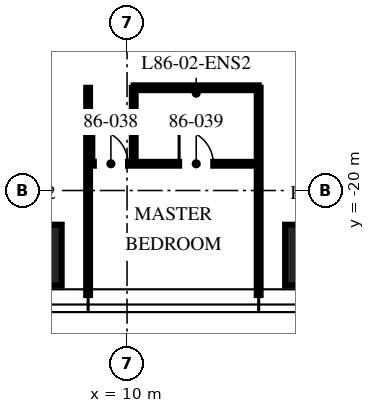
"""IFC4 building model, lengths in metres.
Left out: names, types, materials, properties, quantities, classifications, styles, units other than length and angle.
Written with IfcOpenShell. Run it as: python <this file> out.ifc"""

import sys

from ifc_helpers import new_model, si_unit, direction, frame, frame_2d, origin, origin_2d, place, context, subcontext, project, spatial, rectangle, extrude, element, fill, save


model = new_model("IFC4")
c1 = context("Model", 3, precision=1e-05, world=origin(), true_north=direction((0.0, 1.0)))
c2 = subcontext(c1, "Body", "Model", "MODEL_VIEW")
j1 = project(units=[si_unit("LENGTHUNIT", "METRE"), si_unit("PLANEANGLEUNIT", "RADIAN")], contexts=[c1])
p1 = place(None, origin())
s1 = spatial("IfcSite", under=j1, at=p1, CompositionType="ELEMENT")
p2 = place(p1, origin())
s2 = spatial("IfcBuilding", under=s1, at=p2, CompositionType="ELEMENT")
p3 = place(p2, frame((0.0, 0.0, 342.0)))
s3 = spatial("IfcBuildingStorey", under=s2, at=p3, CompositionType="ELEMENT", Elevation=342.0)
for number, where, z_axis, x_axis in (
    (1, (14.96, -21.7, 0.0), (0.0, 0.0, 1.0), (1.0, 0.0, 0.0)),
    (2, (7.48, -21.7, 0.0), (0.0, 0.0, 1.0), (1.0, 0.0, 0.0)),
):
    element("IfcColumn", number, at=place(p3, frame(where, z_axis=z_axis, x_axis=x_axis)), inside=s3, PredefinedType="COLUMN", context=c2, shape_type="SweptSolid", body=[
        extrude(rectangle(XDim=1.6, YDim=1.6, at=origin_2d()), origin(), (0.0, 0.0, 1.0), 3.75),
    ])
for number, where, z_axis, x_axis in (
    (3, (8.976, -17.296, 0.0), (0.0, 0.0, 1.0), (0.0, -1.0, 0.0)),
    (4, (13.464, -17.296, 0.0), (0.0, 0.0, 1.0), (0.0, -1.0, 0.0)),
):
    element("IfcWall", number, at=place(p3, frame(where, z_axis=z_axis, x_axis=x_axis)), inside=s3, PredefinedType="PARTITIONING", context=c2, shape_type="SweptSolid", body=[
        extrude(rectangle(XDim=5.454, YDim=0.1, at=frame_2d((2.727, 0.0))), origin(), (0.0, 0.0, 1.0), 3.01),
    ])
p4 = place(p3, frame((8.976, -19.296, 0.0), z_axis=(0.0, 0.0, 1.0), x_axis=(1.0, 0.0, 0.0)))
e5 = element("IfcWall", 5, at=p4, inside=s3, PredefinedType="PARTITIONING", context=c2, shape_type="SweptSolid", body=[
    extrude(rectangle(XDim=4.488, YDim=0.1, at=frame_2d((2.244, 0.0))), origin(), (0.0, 0.0, 1.0), 2.91),
])
p5 = place(p4, frame((0.15, 0.0, 0.0)))
e6 = element("IfcOpeningElement", 6, at=p5, cuts=e5, PredefinedType="OPENING", context=c2, shape_type="SweptSolid", body=[
    extrude(rectangle(XDim=0.9, YDim=2.1, at=frame_2d((0.45, 1.05))), frame((0.0, 0.06, 0.0), z_axis=(0.0, -1.0, 0.0), x_axis=(1.0, 0.0, 0.0)), (0.0, 0.0, 1.0), 0.12),
])
p6 = place(p4, frame((2.394, 0.0, 0.0)))
e7 = element("IfcOpeningElement", 7, at=p6, cuts=e5, PredefinedType="OPENING", context=c2, shape_type="SweptSolid", body=[
    extrude(rectangle(XDim=0.9, YDim=2.1, at=frame_2d((0.45, 1.05))), frame((0.0, 0.06, 0.0), z_axis=(0.0, -1.0, 0.0), x_axis=(1.0, 0.0, 0.0)), (0.0, 0.0, 1.0), 0.12),
])
p7 = place(p3, frame((10.176, -17.296, 0.0), z_axis=(0.0, 0.0, 1.0), x_axis=(0.0, -1.0, 0.0)))
e8 = element("IfcWall", 8, at=p7, inside=s3, PredefinedType="PARTITIONING", context=c2, shape_type="SweptSolid", body=[
    extrude(rectangle(XDim=2.0, YDim=0.1, at=frame_2d((1.0, 0.0))), origin(), (0.0, 0.0, 1.0), 3.5),
])
p8 = place(p3, frame((10.176, -17.296, 0.0), z_axis=(0.0, 0.0, 1.0), x_axis=(1.0, 0.0, 0.0)))
e9 = element("IfcWall", 9, at=p8, inside=s3, PredefinedType="PARTITIONING", context=c2, shape_type="SweptSolid", body=[
    extrude(rectangle(XDim=3.288, YDim=0.125, at=frame_2d((1.644, 0.0))), origin(), (0.0, 0.0, 1.0), 2.91),
])
p9 = place(p5, origin())
e10 = element("IfcDoor", 10, at=p9, inside=s3, OperationType="SINGLE_SWING_LEFT", PredefinedType="DOOR", context=c2, shape_type="SweptSolid", body=[
    extrude(rectangle(XDim=0.9, YDim=2.1, at=frame_2d((0.45, 1.05))), frame((0.0, 0.025, 0.0), z_axis=(0.0, -1.0, 0.0), x_axis=(1.0, 0.0, 0.0)), (0.0, 0.0, 1.0), 0.05),
])
fill(e6, e10)
p10 = place(p6, origin())
e11 = element("IfcDoor", 11, at=p10, inside=s3, OperationType="SINGLE_SWING_LEFT", PredefinedType="DOOR", context=c2, shape_type="SweptSolid", body=[
    extrude(rectangle(XDim=0.9, YDim=2.1, at=frame_2d((0.45, 1.05))), frame((0.0, 0.025, 0.0), z_axis=(0.0, -1.0, 0.0), x_axis=(1.0, 0.0, 0.0)), (0.0, 0.0, 1.0), 0.05),
])
fill(e7, e11)
save(model, sys.argv[1])
